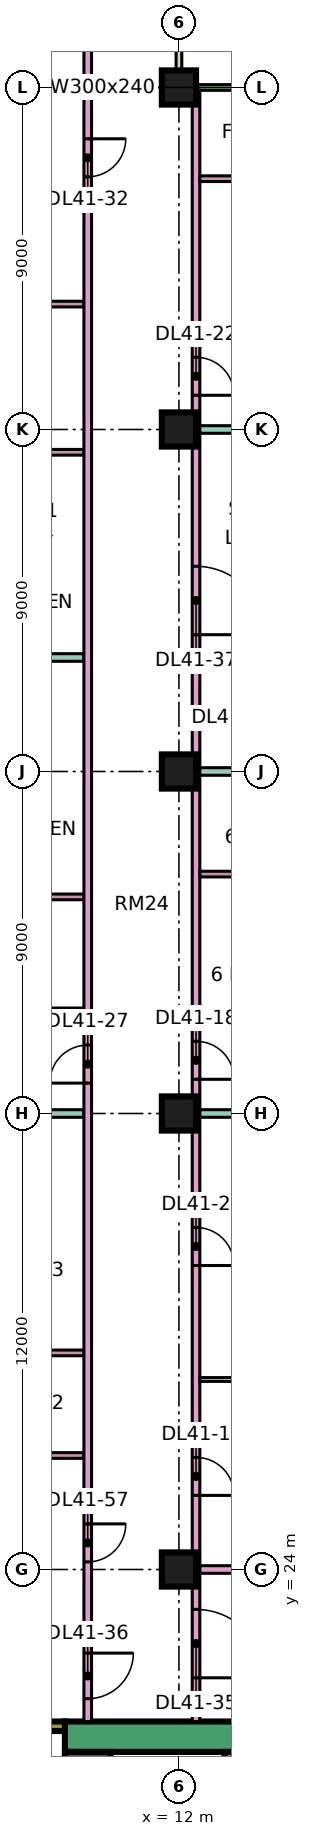
"""IFC4 building model, lengths in metres.
Left out: names, types, materials, properties, quantities, classifications, styles, units other than length and angle.
Written with IfcOpenShell. Run it as: python <this file> out.ifc"""

import sys

from ifc_helpers import new_model, si_unit, direction, frame, frame_2d, origin, origin_2d, place, context, subcontext, project, spatial, rectangle, extrude, element, fill, save


model = new_model("IFC4")
c1 = context("Model", 3, precision=1e-05, world=origin(), true_north=direction((0.0, 1.0)))
c2 = subcontext(c1, "Body", "Model", "MODEL_VIEW")
j1 = project(units=[si_unit("LENGTHUNIT", "METRE"), si_unit("PLANEANGLEUNIT", "RADIAN")], contexts=[c1])
p1 = place(None, origin())
s1 = spatial("IfcSite", under=j1, at=p1, CompositionType="ELEMENT")
p2 = place(p1, origin())
s2 = spatial("IfcBuilding", under=s1, at=p2, CompositionType="ELEMENT")
p3 = place(p2, frame((0.0, 0.0, 179.9)))
s3 = spatial("IfcBuildingStorey", under=s2, at=p3, CompositionType="ELEMENT", Elevation=179.9)
for number, where, z_axis, x_axis in (
    (1, (12.0, 24.0, 0.0), (0.0, 0.0, 1.0), (1.0, 0.0, 0.0)),
    (2, (12.0, 36.0, 0.0), (0.0, 0.0, 1.0), (1.0, 0.0, 0.0)),
    (3, (12.0, 45.0, 0.0), (0.0, 0.0, 1.0), (1.0, 0.0, 0.0)),
    (4, (12.0, 54.0, 0.0), (0.0, 0.0, 1.0), (1.0, 0.0, 0.0)),
    (5, (12.0, 63.0, 0.0), (0.0, 0.0, 1.0), (1.0, 0.0, 0.0)),
):
    element("IfcColumn", number, at=place(p3, frame(where, z_axis=z_axis, x_axis=x_axis)), inside=s3, PredefinedType="COLUMN", context=c2, shape_type="SweptSolid", body=[
        extrude(rectangle(XDim=0.9, YDim=0.9, at=origin_2d()), origin(), (0.0, 0.0, 1.0), 3.75),
    ])
p4 = place(p3, frame((9.0, 19.6, 0.0), z_axis=(0.0, 0.0, 1.0), x_axis=(1.0, 0.0, 0.0)))
e6 = element("IfcWall", 6, at=p4, inside=s3, PredefinedType="SHEAR", context=c2, shape_type="SweptSolid", body=[
    extrude(rectangle(XDim=25.0, YDim=0.8, at=frame_2d((12.5, 0.0))), origin(), (0.0, 0.0, 1.0), 3.75),
])
p5 = place(p4, frame((19.1, 0.0, 0.0)))
e7 = element("IfcOpeningElement", 7, at=p5, cuts=e6, PredefinedType="OPENING", context=c2, shape_type="SweptSolid", body=[
    extrude(rectangle(XDim=1.8, YDim=2.4, at=frame_2d((0.9, 1.2))), frame((0.0, 0.41, 0.0), z_axis=(0.0, -1.0, 0.0), x_axis=(1.0, 0.0, 0.0)), (0.0, 0.0, 1.0), 0.82),
])
p6 = place(p3, frame((9.6, 7.8, 0.0), z_axis=(0.0, 0.0, 1.0), x_axis=(0.0, 1.0, 0.0)))
e8 = element("IfcWall", 8, at=p6, inside=s3, PredefinedType="SHEAR", context=c2, shape_type="SweptSolid", body=[
    extrude(rectangle(XDim=11.4, YDim=1.2, at=frame_2d((5.7, 0.0))), origin(), (0.0, 0.0, 1.0), 3.75),
])
p7 = place(p6, frame((4.075, 0.0, 0.0)))
e9 = element("IfcOpeningElement", 9, at=p7, cuts=e8, PredefinedType="OPENING", context=c2, shape_type="SweptSolid", body=[
    extrude(rectangle(XDim=1.1, YDim=2.2, at=frame_2d((0.55, 1.1))), frame((0.0, 0.61, 0.0), z_axis=(0.0, -1.0, 0.0), x_axis=(1.0, 0.0, 0.0)), (0.0, 0.0, 1.0), 1.22),
])
p8 = place(p6, frame((6.575, 0.0, 0.0)))
e10 = element("IfcOpeningElement", 10, at=p8, cuts=e8, PredefinedType="OPENING", context=c2, shape_type="SweptSolid", body=[
    extrude(rectangle(XDim=1.1, YDim=2.2, at=frame_2d((0.55, 1.1))), frame((0.0, 0.61, 0.0), z_axis=(0.0, -1.0, 0.0), x_axis=(1.0, 0.0, 0.0)), (0.0, 0.0, 1.0), 1.22),
])
p9 = place(p6, frame((9.4, 0.0, 0.0)))
e11 = element("IfcOpeningElement", 11, at=p9, cuts=e8, PredefinedType="OPENING", context=c2, shape_type="SweptSolid", body=[
    extrude(rectangle(XDim=1.1, YDim=2.2, at=frame_2d((0.55, 1.1))), frame((0.0, 0.61, 0.0), z_axis=(0.0, -1.0, 0.0), x_axis=(1.0, 0.0, 0.0)), (0.0, 0.0, 1.0), 1.22),
])
p10 = place(p6, frame((1.75, 0.0, 0.0)))
e12 = element("IfcOpeningElement", 12, at=p10, cuts=e8, PredefinedType="OPENING", context=c2, shape_type="SweptSolid", body=[
    extrude(rectangle(XDim=0.9, YDim=2.1, at=frame_2d((0.45, 1.05))), frame((0.0, 0.61, 0.0), z_axis=(0.0, -1.0, 0.0), x_axis=(1.0, 0.0, 0.0)), (0.0, 0.0, 1.0), 1.22),
])
p11 = place(p3, frame((13.325, 7.8, 0.0), z_axis=(0.0, 0.0, 1.0), x_axis=(0.0, 1.0, 0.0)))
e13 = element("IfcWall", 13, at=p11, inside=s3, PredefinedType="SHEAR", context=c2, shape_type="SweptSolid", body=[
    extrude(rectangle(XDim=11.4, YDim=0.25, at=frame_2d((5.7, 0.0))), origin(), (0.0, 0.0, 1.0), 3.75),
])
p12 = place(p3, frame((2.1, 19.875, 0.0), z_axis=(0.0, 0.0, 1.0), x_axis=(1.0, 0.0, 0.0)))
e14 = element("IfcWall", 14, at=p12, inside=s3, PredefinedType="SHEAR", context=c2, shape_type="SweptSolid", body=[
    extrude(rectangle(XDim=6.9, YDim=0.25, at=frame_2d((3.45, 0.0))), origin(), (0.0, 0.0, 1.0), 3.75),
])
p13 = place(p12, frame((1.175, 0.0, 0.0)))
e15 = element("IfcOpeningElement", 15, at=p13, cuts=e14, PredefinedType="OPENING", context=c2, shape_type="SweptSolid", body=[
    extrude(rectangle(XDim=1.1, YDim=2.2, at=frame_2d((0.55, 1.1))), frame((0.0, 0.135, 0.0), z_axis=(0.0, -1.0, 0.0), x_axis=(1.0, 0.0, 0.0)), (0.0, 0.0, 1.0), 0.27),
])
p14 = place(p12, frame((4.6, 0.0, 0.0)))
e16 = element("IfcOpeningElement", 16, at=p14, cuts=e14, PredefinedType="OPENING", context=c2, shape_type="SweptSolid", body=[
    extrude(rectangle(XDim=1.2, YDim=2.2, at=frame_2d((0.6, 1.1))), frame((0.0, 0.135, 0.0), z_axis=(0.0, -1.0, 0.0), x_axis=(1.0, 0.0, 0.0)), (0.0, 0.0, 1.0), 0.27),
])
p15 = place(p3, frame((22.425, 63.0, 0.0), z_axis=(0.0, 0.0, 1.0), x_axis=(-1.0, 0.0, 0.0)))
e17 = element("IfcWall", 17, at=p15, inside=s3, PredefinedType="SOLIDWALL", context=c2, shape_type="SweptSolid", body=[
    extrude(rectangle(XDim=10.35, YDim=0.15, at=frame_2d((5.175, 0.0))), origin(), (0.0, 0.0, 1.0), 3.35),
])
p16 = place(p15, frame((0.788, 0.0, 0.0)))
e18 = element("IfcOpeningElement", 18, at=p16, cuts=e17, PredefinedType="OPENING", context=c2, shape_type="SweptSolid", body=[
    extrude(rectangle(XDim=1.8, YDim=2.4, at=frame_2d((0.9, 1.2))), frame((0.0, 0.085, 0.0), z_axis=(0.0, -1.0, 0.0), x_axis=(1.0, 0.0, 0.0)), (0.0, 0.0, 1.0), 0.17),
])
p17 = place(p15, frame((5.725, 0.0, 0.45)))
e19 = element("IfcOpeningElement", 19, at=p17, cuts=e17, PredefinedType="OPENING", context=c2, shape_type="SweptSolid", body=[
    extrude(rectangle(XDim=3.0, YDim=2.4, at=frame_2d((1.5, 1.2))), frame((0.0, 0.085, 0.0), z_axis=(0.0, -1.0, 0.0), x_axis=(1.0, 0.0, 0.0)), (0.0, 0.0, 1.0), 0.17),
])
p18 = place(p3, frame((12.0, 64.5, 0.0), z_axis=(0.0, 0.0, 1.0), x_axis=(0.0, -1.0, 0.0)))
e20 = element("IfcWall", 20, at=p18, inside=s3, PredefinedType="SOLIDWALL", context=c2, shape_type="SweptSolid", body=[
    extrude(rectangle(XDim=1.5, YDim=0.15, at=frame_2d((0.75, 0.0))), origin(), (0.0, 0.0, 1.0), 3.35),
])
p19 = place(p3, frame((0.0, 36.0, 0.0), z_axis=(0.0, 0.0, 1.0), x_axis=(1.0, 0.0, 0.0)))
e21 = element("IfcWall", 21, at=p19, inside=s3, PredefinedType="PARTITIONING", context=c2, shape_type="SweptSolid", body=[
    extrude(rectangle(XDim=9.5, YDim=0.2, at=frame_2d((4.75, 0.0))), origin(), (0.0, 0.0, 1.0), 3.35),
])
p20 = place(p3, frame((0.074, 22.4, 0.0), z_axis=(0.0, 0.0, 1.0), x_axis=(1.0, 0.0, 0.0)))
e22 = element("IfcWall", 22, at=p20, inside=s3, PredefinedType="PARTITIONING", context=c2, shape_type="SweptSolid", body=[
    extrude(rectangle(XDim=9.426, YDim=0.2, at=frame_2d((4.713, 0.0))), origin(), (0.0, 0.0, 1.0), 3.35),
])
for number, where, z_axis, x_axis in (
    (23, (6.375, 38.7, 0.0), (0.0, 0.0, 1.0), (1.0, 0.0, 0.0)),
    (24, (6.375, 41.7, 0.0), (0.0, 0.0, 1.0), (1.0, 0.0, 0.0)),
):
    element("IfcWall", number, at=place(p3, frame(where, z_axis=z_axis, x_axis=x_axis)), inside=s3, PredefinedType="PARTITIONING", context=c2, shape_type="SweptSolid", body=[
        extrude(rectangle(XDim=3.125, YDim=0.15, at=frame_2d((1.562, 0.0))), origin(), (0.0, 0.0, 1.0), 3.35),
    ])
p21 = place(p3, frame((6.525, 48.0, 0.0), z_axis=(0.0, 0.0, 1.0), x_axis=(1.0, 0.0, 0.0)))
e25 = element("IfcWall", 25, at=p21, inside=s3, PredefinedType="PARTITIONING", context=c2, shape_type="SweptSolid", body=[
    extrude(rectangle(XDim=2.975, YDim=0.2, at=frame_2d((1.488, 0.0))), origin(), (0.0, 0.0, 1.0), 3.35),
])
for number, where, z_axis, x_axis in (
    (26, (6.675, 53.4, 0.0), (0.0, 0.0, 1.0), (1.0, 0.0, 0.0)),
    (27, (6.675, 57.3, 0.0), (0.0, 0.0, 1.0), (1.0, 0.0, 0.0)),
):
    element("IfcWall", number, at=place(p3, frame(where, z_axis=z_axis, x_axis=x_axis)), inside=s3, PredefinedType="PARTITIONING", context=c2, shape_type="SweptSolid", body=[
        extrude(rectangle(XDim=2.825, YDim=0.15, at=frame_2d((1.413, 0.0))), origin(), (0.0, 0.0, 1.0), 3.35),
    ])
for number, where, z_axis, x_axis in (
    (28, (6.975, 27.0, 0.0), (0.0, 0.0, 1.0), (1.0, 0.0, 0.0)),
    (29, (6.975, 29.7, 0.0), (0.0, 0.0, 1.0), (1.0, 0.0, 0.0)),
):
    element("IfcWall", number, at=place(p3, frame(where, z_axis=z_axis, x_axis=x_axis)), inside=s3, PredefinedType="PARTITIONING", context=c2, shape_type="SweptSolid", body=[
        extrude(rectangle(XDim=2.525, YDim=0.15, at=frame_2d((1.262, 0.0))), origin(), (0.0, 0.0, 1.0), 3.35),
    ])
p22 = place(p3, frame((9.6, 20.0, 0.0), z_axis=(0.0, 0.0, 1.0), x_axis=(0.0, 1.0, 0.0)))
e30 = element("IfcWall", 30, at=p22, inside=s3, PredefinedType="PARTITIONING", context=c2, shape_type="SweptSolid", body=[
    extrude(rectangle(XDim=44.35, YDim=0.2, at=frame_2d((22.175, 0.0))), origin(), (0.0, 0.0, 1.0), 3.35),
])
p23 = place(p22, frame((16.8, 0.0, 0.0)))
e31 = element("IfcOpeningElement", 31, at=p23, cuts=e30, PredefinedType="OPENING", context=c2, shape_type="SweptSolid", body=[
    extrude(rectangle(XDim=1.0, YDim=2.1, at=frame_2d((0.5, 1.05))), frame((0.0, 0.11, 0.0), z_axis=(0.0, -1.0, 0.0), x_axis=(1.0, 0.0, 0.0)), (0.0, 0.0, 1.0), 0.22),
])
p24 = place(p22, frame((40.65, 0.0, 0.0)))
e32 = element("IfcOpeningElement", 32, at=p24, cuts=e30, PredefinedType="OPENING", context=c2, shape_type="SweptSolid", body=[
    extrude(rectangle(XDim=1.0, YDim=2.1, at=frame_2d((0.5, 1.05))), frame((0.0, 0.11, 0.0), z_axis=(0.0, -1.0, 0.0), x_axis=(1.0, 0.0, 0.0)), (0.0, 0.0, 1.0), 0.22),
])
p25 = place(p22, frame((0.6, 0.0, 0.0)))
e33 = element("IfcOpeningElement", 33, at=p25, cuts=e30, PredefinedType="OPENING", context=c2, shape_type="SweptSolid", body=[
    extrude(rectangle(XDim=1.2, YDim=2.1, at=frame_2d((0.6, 1.05))), frame((0.0, 0.11, 0.0), z_axis=(0.0, -1.0, 0.0), x_axis=(1.0, 0.0, 0.0)), (0.0, 0.0, 1.0), 0.22),
])
p26 = place(p22, frame((4.2, 0.0, 0.0)))
e34 = element("IfcOpeningElement", 34, at=p26, cuts=e30, PredefinedType="OPENING", context=c2, shape_type="SweptSolid", body=[
    extrude(rectangle(XDim=1.0, YDim=2.1, at=frame_2d((0.5, 1.05))), frame((0.0, 0.11, 0.0), z_axis=(0.0, -1.0, 0.0), x_axis=(1.0, 0.0, 0.0)), (0.0, 0.0, 1.0), 0.22),
])
p27 = place(p3, frame((12.45, 20.0, 0.0), z_axis=(0.0, 0.0, 1.0), x_axis=(0.0, 1.0, 0.0)))
e35 = element("IfcWall", 35, at=p27, inside=s3, PredefinedType="PARTITIONING", context=c2, shape_type="SweptSolid", body=[
    extrude(rectangle(XDim=42.926, YDim=0.2, at=frame_2d((21.463, 0.0))), origin(), (0.0, 0.0, 1.0), 3.35),
])
p28 = place(p27, frame((5.95, 0.0, 0.0)))
e36 = element("IfcOpeningElement", 36, at=p28, cuts=e35, PredefinedType="OPENING", context=c2, shape_type="SweptSolid", body=[
    extrude(rectangle(XDim=1.0, YDim=2.1, at=frame_2d((0.5, 1.05))), frame((0.0, 0.11, 0.0), z_axis=(0.0, -1.0, 0.0), x_axis=(1.0, 0.0, 0.0)), (0.0, 0.0, 1.0), 0.22),
])
p29 = place(p27, frame((12.0, 0.0, 0.0)))
e37 = element("IfcOpeningElement", 37, at=p29, cuts=e35, PredefinedType="OPENING", context=c2, shape_type="SweptSolid", body=[
    extrude(rectangle(XDim=1.0, YDim=2.1, at=frame_2d((0.5, 1.05))), frame((0.0, 0.11, 0.0), z_axis=(0.0, -1.0, 0.0), x_axis=(1.0, 0.0, 0.0)), (0.0, 0.0, 1.0), 0.22),
])
p30 = place(p27, frame((16.9, 0.0, 0.0)))
e38 = element("IfcOpeningElement", 38, at=p30, cuts=e35, PredefinedType="OPENING", context=c2, shape_type="SweptSolid", body=[
    extrude(rectangle(XDim=1.0, YDim=2.1, at=frame_2d((0.5, 1.05))), frame((0.0, 0.11, 0.0), z_axis=(0.0, -1.0, 0.0), x_axis=(1.0, 0.0, 0.0)), (0.0, 0.0, 1.0), 0.22),
])
p31 = place(p27, frame((34.9, 0.0, 0.0)))
e39 = element("IfcOpeningElement", 39, at=p31, cuts=e35, PredefinedType="OPENING", context=c2, shape_type="SweptSolid", body=[
    extrude(rectangle(XDim=1.0, YDim=2.1, at=frame_2d((0.5, 1.05))), frame((0.0, 0.11, 0.0), z_axis=(0.0, -1.0, 0.0), x_axis=(1.0, 0.0, 0.0)), (0.0, 0.0, 1.0), 0.22),
])
p32 = place(p27, frame((1.15, 0.0, 0.0)))
e40 = element("IfcOpeningElement", 40, at=p32, cuts=e35, PredefinedType="OPENING", context=c2, shape_type="SweptSolid", body=[
    extrude(rectangle(XDim=1.8, YDim=2.1, at=frame_2d((0.9, 1.05))), frame((0.0, 0.11, 0.0), z_axis=(0.0, -1.0, 0.0), x_axis=(1.0, 0.0, 0.0)), (0.0, 0.0, 1.0), 0.22),
])
p33 = place(p27, frame((28.6, 0.0, 0.0)))
e41 = element("IfcOpeningElement", 41, at=p33, cuts=e35, PredefinedType="OPENING", context=c2, shape_type="SweptSolid", body=[
    extrude(rectangle(XDim=1.8, YDim=2.1, at=frame_2d((0.9, 1.05))), frame((0.0, 0.11, 0.0), z_axis=(0.0, -1.0, 0.0), x_axis=(1.0, 0.0, 0.0)), (0.0, 0.0, 1.0), 0.22),
])
p34 = place(p3, frame((12.55, 24.0, 0.0), z_axis=(0.0, 0.0, 1.0), x_axis=(1.0, 0.0, 0.0)))
e42 = element("IfcWall", 42, at=p34, inside=s3, PredefinedType="PARTITIONING", context=c2, shape_type="SweptSolid", body=[
    extrude(rectangle(XDim=8.95, YDim=0.2, at=frame_2d((4.475, 0.0))), origin(), (0.0, 0.0, 1.0), 3.35),
])
p35 = place(p3, frame((12.55, 29.0, 0.0), z_axis=(0.0, 0.0, 1.0), x_axis=(1.0, 0.0, 0.0)))
e43 = element("IfcWall", 43, at=p35, inside=s3, PredefinedType="PARTITIONING", context=c2, shape_type="SweptSolid", body=[
    extrude(rectangle(XDim=8.95, YDim=0.1, at=frame_2d((4.475, 0.0))), origin(), (0.0, 0.0, 1.0), 3.35),
])
p36 = place(p3, frame((12.55, 36.0, 0.0), z_axis=(0.0, 0.0, 1.0), x_axis=(1.0, 0.0, 0.0)))
e44 = element("IfcWall", 44, at=p36, inside=s3, PredefinedType="PARTITIONING", context=c2, shape_type="SweptSolid", body=[
    extrude(rectangle(XDim=11.45, YDim=0.2, at=frame_2d((5.725, 0.0))), origin(), (0.0, 0.0, 1.0), 3.35),
])
for number, where, z_axis, x_axis in (
    (45, (12.55, 38.7, 0.0), (0.0, 0.0, 1.0), (1.0, 0.0, 0.0)),
    (46, (12.55, 42.3, 0.0), (0.0, 0.0, 1.0), (1.0, 0.0, 0.0)),
):
    element("IfcWall", number, at=place(p3, frame(where, z_axis=z_axis, x_axis=x_axis)), inside=s3, PredefinedType="PARTITIONING", context=c2, shape_type="SweptSolid", body=[
        extrude(rectangle(XDim=4.025, YDim=0.15, at=frame_2d((2.012, 0.0))), origin(), (0.0, 0.0, 1.0), 3.35),
    ])
p37 = place(p3, frame((12.55, 45.0, 0.0), z_axis=(0.0, 0.0, 1.0), x_axis=(1.0, 0.0, 0.0)))
e47 = element("IfcWall", 47, at=p37, inside=s3, PredefinedType="PARTITIONING", context=c2, shape_type="SweptSolid", body=[
    extrude(rectangle(XDim=11.376, YDim=0.2, at=frame_2d((5.688, 0.0))), origin(), (0.0, 0.0, 1.0), 3.35),
])
p38 = place(p3, frame((12.55, 54.0, 0.0), z_axis=(0.0, 0.0, 1.0), x_axis=(1.0, 0.0, 0.0)))
e48 = element("IfcWall", 48, at=p38, inside=s3, PredefinedType="PARTITIONING", context=c2, shape_type="SweptSolid", body=[
    extrude(rectangle(XDim=11.45, YDim=0.2, at=frame_2d((5.725, 0.0))), origin(), (0.0, 0.0, 1.0), 3.35),
])
for number, where, z_axis, x_axis in (
    (49, (12.55, 56.7, 0.0), (0.0, 0.0, 1.0), (1.0, 0.0, 0.0)),
    (50, (12.55, 60.6, 0.0), (0.0, 0.0, 1.0), (1.0, 0.0, 0.0)),
):
    element("IfcWall", number, at=place(p3, frame(where, z_axis=z_axis, x_axis=x_axis)), inside=s3, PredefinedType="PARTITIONING", context=c2, shape_type="SweptSolid", body=[
        extrude(rectangle(XDim=5.225, YDim=0.15, at=frame_2d((2.612, 0.0))), origin(), (0.0, 0.0, 1.0), 3.35),
    ])
p39 = place(p28, frame((1.0, 0.0, 0.0), z_axis=(0.0, 0.0, 1.0), x_axis=(-1.0, 0.0, 0.0)))
e51 = element("IfcDoor", 51, at=p39, inside=s3, OperationType="SINGLE_SWING_LEFT", PredefinedType="DOOR", context=c2, shape_type="SweptSolid", body=[
    extrude(rectangle(XDim=1.0, YDim=2.1, at=frame_2d((0.5, 1.05))), frame((0.0, 0.025, 0.0), z_axis=(0.0, -1.0, 0.0), x_axis=(1.0, 0.0, 0.0)), (0.0, 0.0, 1.0), 0.05),
])
fill(e36, e51)
p40 = place(p29, frame((1.0, 0.0, 0.0), z_axis=(0.0, 0.0, 1.0), x_axis=(-1.0, 0.0, 0.0)))
e52 = element("IfcDoor", 52, at=p40, inside=s3, OperationType="SINGLE_SWING_LEFT", PredefinedType="DOOR", context=c2, shape_type="SweptSolid", body=[
    extrude(rectangle(XDim=1.0, YDim=2.1, at=frame_2d((0.5, 1.05))), frame((0.0, 0.025, 0.0), z_axis=(0.0, -1.0, 0.0), x_axis=(1.0, 0.0, 0.0)), (0.0, 0.0, 1.0), 0.05),
])
fill(e37, e52)
p41 = place(p30, frame((1.0, 0.0, 0.0), z_axis=(0.0, 0.0, 1.0), x_axis=(-1.0, 0.0, 0.0)))
e53 = element("IfcDoor", 53, at=p41, inside=s3, OperationType="SINGLE_SWING_LEFT", PredefinedType="DOOR", context=c2, shape_type="SweptSolid", body=[
    extrude(rectangle(XDim=1.0, YDim=2.1, at=frame_2d((0.5, 1.05))), frame((0.0, 0.025, 0.0), z_axis=(0.0, -1.0, 0.0), x_axis=(1.0, 0.0, 0.0)), (0.0, 0.0, 1.0), 0.05),
])
fill(e38, e53)
p42 = place(p31, frame((1.0, 0.0, 0.0), z_axis=(0.0, 0.0, 1.0), x_axis=(-1.0, 0.0, 0.0)))
e54 = element("IfcDoor", 54, at=p42, inside=s3, OperationType="SINGLE_SWING_LEFT", PredefinedType="DOOR", context=c2, shape_type="SweptSolid", body=[
    extrude(rectangle(XDim=1.0, YDim=2.1, at=frame_2d((0.5, 1.05))), frame((0.0, 0.025, 0.0), z_axis=(0.0, -1.0, 0.0), x_axis=(1.0, 0.0, 0.0)), (0.0, 0.0, 1.0), 0.05),
])
fill(e39, e54)
p43 = place(p23, origin())
e55 = element("IfcDoor", 55, at=p43, inside=s3, OperationType="SINGLE_SWING_LEFT", PredefinedType="DOOR", context=c2, shape_type="SweptSolid", body=[
    extrude(rectangle(XDim=1.0, YDim=2.1, at=frame_2d((0.5, 1.05))), frame((0.0, 0.025, 0.0), z_axis=(0.0, -1.0, 0.0), x_axis=(1.0, 0.0, 0.0)), (0.0, 0.0, 1.0), 0.05),
])
fill(e31, e55)
p44 = place(p24, origin())
e56 = element("IfcDoor", 56, at=p44, inside=s3, OperationType="SINGLE_SWING_RIGHT", PredefinedType="DOOR", context=c2, shape_type="SweptSolid", body=[
    extrude(rectangle(XDim=1.0, YDim=2.1, at=frame_2d((0.5, 1.05))), frame((0.0, 0.025, 0.0), z_axis=(0.0, -1.0, 0.0), x_axis=(1.0, 0.0, 0.0)), (0.0, 0.0, 1.0), 0.05),
])
fill(e32, e56)
p45 = place(p32, frame((1.8, 0.0, 0.0), z_axis=(0.0, 0.0, 1.0), x_axis=(-1.0, 0.0, 0.0)))
e57 = element("IfcDoor", 57, at=p45, inside=s3, OperationType="DOUBLE_DOOR_SINGLE_SWING", PredefinedType="DOOR", context=c2, shape_type="SweptSolid", body=[
    extrude(rectangle(XDim=1.8, YDim=2.1, at=frame_2d((0.9, 1.05))), frame((0.0, 0.025, 0.0), z_axis=(0.0, -1.0, 0.0), x_axis=(1.0, 0.0, 0.0)), (0.0, 0.0, 1.0), 0.05),
])
fill(e40, e57)
p46 = place(p25, origin())
e58 = element("IfcDoor", 58, at=p46, inside=s3, OperationType="SINGLE_SWING_RIGHT", PredefinedType="DOOR", context=c2, shape_type="SweptSolid", body=[
    extrude(rectangle(XDim=1.2, YDim=2.1, at=frame_2d((0.6, 1.05))), frame((0.0, 0.025, 0.0), z_axis=(0.0, -1.0, 0.0), x_axis=(1.0, 0.0, 0.0)), (0.0, 0.0, 1.0), 0.05),
])
fill(e33, e58)
p47 = place(p33, frame((1.8, 0.0, 0.0), z_axis=(0.0, 0.0, 1.0), x_axis=(-1.0, 0.0, 0.0)))
e59 = element("IfcDoor", 59, at=p47, inside=s3, OperationType="DOUBLE_DOOR_SINGLE_SWING", PredefinedType="DOOR", context=c2, shape_type="SweptSolid", body=[
    extrude(rectangle(XDim=1.8, YDim=2.1, at=frame_2d((0.9, 1.05))), frame((0.0, 0.025, 0.0), z_axis=(0.0, -1.0, 0.0), x_axis=(1.0, 0.0, 0.0)), (0.0, 0.0, 1.0), 0.05),
])
fill(e41, e59)
p48 = place(p26, origin())
e60 = element("IfcDoor", 60, at=p48, inside=s3, OperationType="SINGLE_SWING_RIGHT", PredefinedType="DOOR", context=c2, shape_type="SweptSolid", body=[
    extrude(rectangle(XDim=1.0, YDim=2.1, at=frame_2d((0.5, 1.05))), frame((0.0, 0.025, 0.0), z_axis=(0.0, -1.0, 0.0), x_axis=(1.0, 0.0, 0.0)), (0.0, 0.0, 1.0), 0.05),
])
fill(e34, e60)
save(model, sys.argv[1])
